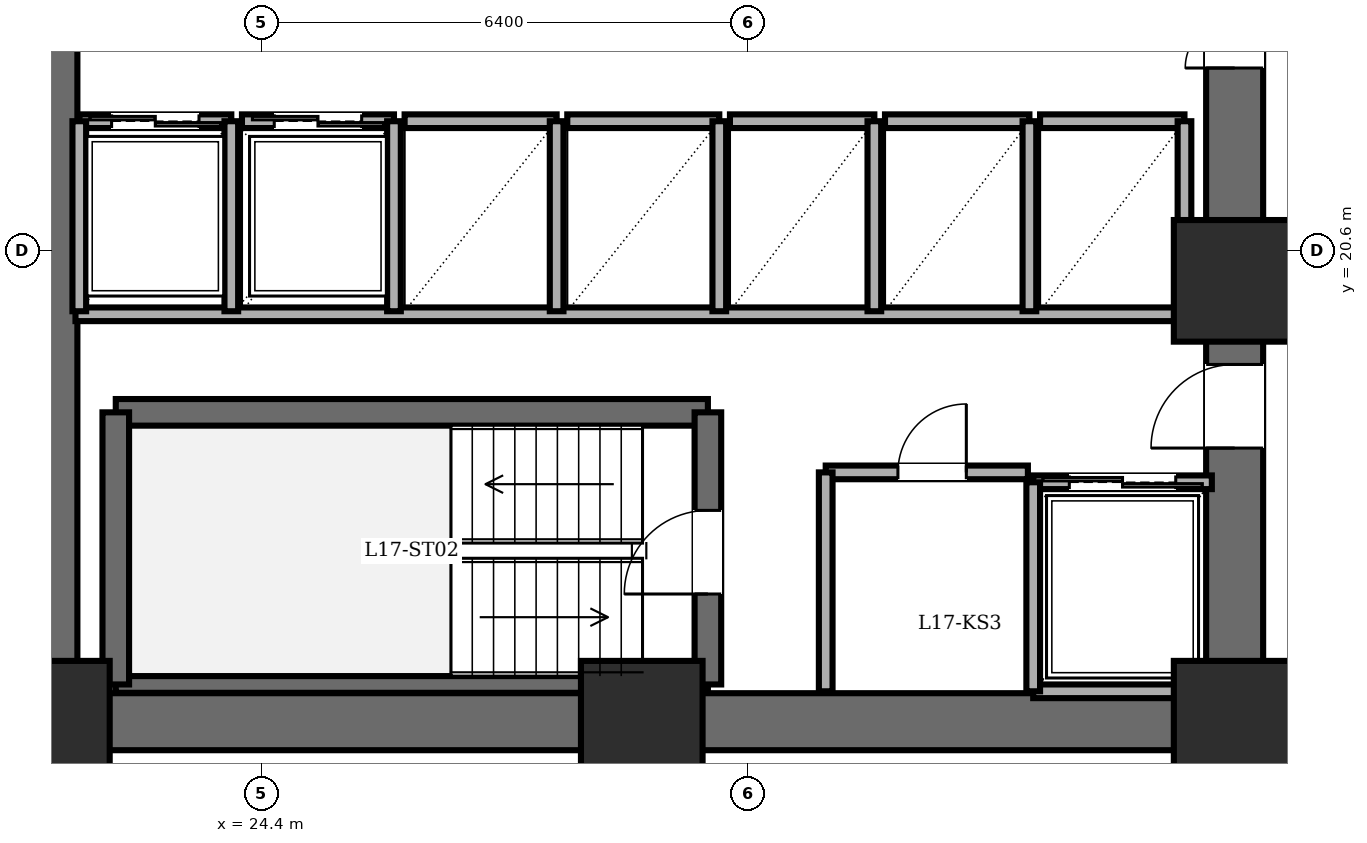
"""IFC4 building model, lengths in metres.
Left out: names, types, materials, properties, quantities, classifications, styles, units other than length and angle.
Written with IfcOpenShell. Run it as: python <this file> out.ifc"""

import sys

from ifc_helpers import new_model, si_unit, direction, frame, frame_2d, origin, origin_2d, place, context, subcontext, project, spatial, rectangle, extrude, element, fill, save


model = new_model("IFC4")
c1 = context("Model", 3, precision=1e-05, world=origin(), true_north=direction((0.0, 1.0)))
c2 = subcontext(c1, "Body", "Model", "MODEL_VIEW")
j1 = project(units=[si_unit("LENGTHUNIT", "METRE"), si_unit("PLANEANGLEUNIT", "RADIAN")], contexts=[c1])
p1 = place(None, origin())
s1 = spatial("IfcSite", under=j1, at=p1, CompositionType="ELEMENT")
p2 = place(p1, origin())
s2 = spatial("IfcBuilding", under=s1, at=p2, CompositionType="ELEMENT")
p3 = place(p2, frame((0.0, 0.0, 64.8)))
s3 = spatial("IfcBuildingStorey", under=s2, at=p3, CompositionType="ELEMENT", Elevation=64.8)
for number, where, z_axis, x_axis in (
    (1, (21.6, 14.4, 0.0), (0.0, 0.0, 1.0), (1.0, 0.0, 0.0)),
    (2, (29.4, 14.4, 0.0), (0.0, 0.0, 1.0), (1.0, 0.0, 0.0)),
    (3, (37.2, 14.4, 0.0), (0.0, 0.0, 1.0), (1.0, 0.0, 0.0)),
    (4, (37.2, 20.2, 0.0), (0.0, 0.0, 1.0), (1.0, 0.0, 0.0)),
):
    element("IfcColumn", number, at=place(p3, frame(where, z_axis=z_axis, x_axis=x_axis)), inside=s3, PredefinedType="COLUMN", context=c2, shape_type="SweptSolid", body=[
        extrude(rectangle(XDim=1.6, YDim=1.6, at=origin_2d()), origin(), (0.0, 0.0, 1.0), 3.6),
    ])
p4 = place(p3, frame((21.6, 14.4, 0.0), z_axis=(0.0, 0.0, 1.0), x_axis=(0.0, 1.0, 0.0)))
e5 = element("IfcWall", 5, at=p4, inside=s3, PredefinedType="SHEAR", context=c2, shape_type="SweptSolid", body=[
    extrude(rectangle(XDim=19.2, YDim=0.75, at=frame_2d((9.6, 0.0))), origin(), (0.0, 0.0, 1.0), 3.4),
])
p5 = place(p3, frame((37.2, 14.4, 0.0), z_axis=(0.0, 0.0, 1.0), x_axis=(-1.0, 0.0, 0.0)))
e6 = element("IfcWall", 6, at=p5, inside=s3, PredefinedType="SHEAR", context=c2, shape_type="SweptSolid", body=[
    extrude(rectangle(XDim=15.6, YDim=0.75, at=frame_2d((7.8, 0.0))), origin(), (0.0, 0.0, 1.0), 3.4),
])
p6 = place(p3, frame((37.2, 14.4, 0.0), z_axis=(0.0, 0.0, 1.0), x_axis=(0.0, 1.0, 0.0)))
e7 = element("IfcWall", 7, at=p6, inside=s3, PredefinedType="SHEAR", context=c2, shape_type="SweptSolid", body=[
    extrude(rectangle(XDim=19.2, YDim=0.75, at=frame_2d((9.6, 0.0))), origin(), (0.0, 0.0, 1.0), 3.4),
])
p7 = place(p6, frame((15.8, 0.0, 0.0)))
e8 = element("IfcOpeningElement", 8, at=p7, cuts=e7, PredefinedType="OPENING", context=c2, shape_type="SweptSolid", body=[
    extrude(rectangle(XDim=1.15, YDim=2.15, at=frame_2d((0.575, 1.075))), frame((0.0, 0.385, 0.0), z_axis=(0.0, -1.0, 0.0), x_axis=(1.0, 0.0, 0.0)), (0.0, 0.0, 1.0), 0.77),
])
p8 = place(p6, frame((3.6, 0.0, 0.0)))
e9 = element("IfcOpeningElement", 9, at=p8, cuts=e7, PredefinedType="OPENING", context=c2, shape_type="SweptSolid", body=[
    extrude(rectangle(XDim=1.1, YDim=2.15, at=frame_2d((0.55, 1.075))), frame((0.0, 0.385, 0.0), z_axis=(0.0, -1.0, 0.0), x_axis=(1.0, 0.0, 0.0)), (0.0, 0.0, 1.0), 0.77),
])
p9 = place(p6, frame((8.6, 0.0, 0.0)))
e10 = element("IfcOpeningElement", 10, at=p9, cuts=e7, PredefinedType="OPENING", context=c2, shape_type="SweptSolid", body=[
    extrude(rectangle(XDim=1.3, YDim=2.2, at=frame_2d((0.65, 1.1))), frame((0.0, 0.385, 0.0), z_axis=(0.0, -1.0, 0.0), x_axis=(1.0, 0.0, 0.0)), (0.0, 0.0, 1.0), 0.77),
])
p10 = place(p3, frame((22.48, 18.47, 0.0), z_axis=(0.0, 0.0, 1.0), x_axis=(1.0, 0.0, 0.0)))
e11 = element("IfcWall", 11, at=p10, inside=s3, PredefinedType="SOLIDWALL", context=c2, shape_type="SweptSolid", body=[
    extrude(rectangle(XDim=7.79, YDim=0.35, at=frame_2d((3.895, 0.0))), origin(), (0.0, 0.0, 1.0), 3.4),
])
p11 = place(p3, frame((22.48, 14.89, 0.0), z_axis=(0.0, 0.0, 1.0), x_axis=(1.0, 0.0, 0.0)))
e12 = element("IfcWall", 12, at=p11, inside=s3, PredefinedType="PARTITIONING", context=c2, shape_type="SweptSolid", body=[
    extrude(rectangle(XDim=7.79, YDim=0.22, at=frame_2d((3.895, 0.0))), origin(), (0.0, 0.0, 1.0), 3.4),
])
p12 = place(p3, frame((22.48, 14.89, 0.0), z_axis=(0.0, 0.0, 1.0), x_axis=(0.0, 1.0, 0.0)))
e13 = element("IfcWall", 13, at=p12, inside=s3, PredefinedType="SOLIDWALL", context=c2, shape_type="SweptSolid", body=[
    extrude(rectangle(XDim=3.58, YDim=0.35, at=frame_2d((1.79, 0.0))), origin(), (0.0, 0.0, 1.0), 3.4),
])
p13 = place(p3, frame((30.27, 14.89, 0.0), z_axis=(0.0, 0.0, 1.0), x_axis=(0.0, 1.0, 0.0)))
e14 = element("IfcWall", 14, at=p13, inside=s3, PredefinedType="SOLIDWALL", context=c2, shape_type="SweptSolid", body=[
    extrude(rectangle(XDim=3.58, YDim=0.35, at=frame_2d((1.79, 0.0))), origin(), (0.0, 0.0, 1.0), 3.4),
])
p14 = place(p13, frame((1.19, 0.0, 0.0)))
e15 = element("IfcOpeningElement", 15, at=p14, cuts=e14, PredefinedType="OPENING", context=c2, shape_type="SweptSolid", body=[
    extrude(rectangle(XDim=1.1, YDim=2.15, at=frame_2d((0.55, 1.075))), frame((0.0, 0.185, 0.0), z_axis=(0.0, -1.0, 0.0), x_axis=(1.0, 0.0, 0.0)), (0.0, 0.0, 1.0), 0.37),
])
p15 = place(p3, frame((21.95, 19.76, 0.0), z_axis=(0.0, 0.0, 1.0), x_axis=(1.0, 0.0, 0.0)))
e16 = element("IfcWall", 16, at=p15, inside=s3, PredefinedType="PARTITIONING", context=c2, shape_type="SweptSolid", body=[
    extrude(rectangle(XDim=14.87, YDim=0.18, at=frame_2d((7.435, 0.0))), origin(), (0.0, 0.0, 1.0), 3.4),
])
p16 = place(p3, frame((31.82, 17.68, 0.0), z_axis=(0.0, 0.0, 1.0), x_axis=(1.0, 0.0, 0.0)))
e17 = element("IfcWall", 17, at=p16, inside=s3, PredefinedType="PARTITIONING", context=c2, shape_type="SweptSolid", body=[
    extrude(rectangle(XDim=2.66, YDim=0.18, at=frame_2d((1.33, 0.0))), origin(), (0.0, 0.0, 1.0), 3.4),
])
p17 = place(p16, frame((0.95, 0.0, 0.0)))
e18 = element("IfcOpeningElement", 18, at=p17, cuts=e17, PredefinedType="OPENING", context=c2, shape_type="SweptSolid", body=[
    extrude(rectangle(XDim=0.9, YDim=2.05, at=frame_2d((0.45, 1.025))), frame((0.0, 0.1, 0.0), z_axis=(0.0, -1.0, 0.0), x_axis=(1.0, 0.0, 0.0)), (0.0, 0.0, 1.0), 0.2),
])
p18 = place(p3, frame((31.82, 14.8, 0.0), z_axis=(0.0, 0.0, 1.0), x_axis=(0.0, 1.0, 0.0)))
e19 = element("IfcWall", 19, at=p18, inside=s3, PredefinedType="PARTITIONING", context=c2, shape_type="SweptSolid", body=[
    extrude(rectangle(XDim=2.88, YDim=0.18, at=frame_2d((1.44, 0.0))), origin(), (0.0, 0.0, 1.0), 3.4),
])
p19 = place(p3, frame((34.55, 17.55, 0.0), z_axis=(0.0, 0.0, 1.0), x_axis=(1.0, 0.0, 0.0)))
e20 = element("IfcWall", 20, at=p19, inside=s3, PredefinedType="PARTITIONING", context=c2, shape_type="SweptSolid", body=[
    extrude(rectangle(XDim=2.35, YDim=0.18, at=frame_2d((1.175, 0.0))), origin(), (0.0, 0.0, 1.0), 3.4),
])
p20 = place(p19, frame((0.475, 0.0, 0.0)))
e21 = element("IfcOpeningElement", 21, at=p20, cuts=e20, PredefinedType="OPENING", context=c2, shape_type="SweptSolid", body=[
    extrude(rectangle(XDim=1.4, YDim=2.3, at=frame_2d((0.7, 1.15))), frame((0.0, 0.1, 0.0), z_axis=(0.0, -1.0, 0.0), x_axis=(1.0, 0.0, 0.0)), (0.0, 0.0, 1.0), 0.2),
])
p21 = place(p3, frame((36.9, 14.8, 0.0), z_axis=(0.0, 0.0, 1.0), x_axis=(-1.0, 0.0, 0.0)))
e22 = element("IfcWall", 22, at=p21, inside=s3, PredefinedType="PARTITIONING", context=c2, shape_type="SweptSolid", body=[
    extrude(rectangle(XDim=2.35, YDim=0.18, at=frame_2d((1.175, 0.0))), origin(), (0.0, 0.0, 1.0), 3.4),
])
p22 = place(p3, frame((34.55, 17.55, 0.0), z_axis=(0.0, 0.0, 1.0), x_axis=(0.0, -1.0, 0.0)))
e23 = element("IfcWall", 23, at=p22, inside=s3, PredefinedType="PARTITIONING", context=c2, shape_type="SweptSolid", body=[
    extrude(rectangle(XDim=2.75, YDim=0.18, at=frame_2d((1.375, 0.0))), origin(), (0.0, 0.0, 1.0), 3.4),
])
p23 = place(p3, frame((22.0, 22.3, 0.0), z_axis=(0.0, 0.0, 1.0), x_axis=(1.0, 0.0, 0.0)))
e24 = element("IfcWall", 24, at=p23, inside=s3, PredefinedType="PARTITIONING", context=c2, shape_type="SweptSolid", body=[
    extrude(rectangle(XDim=2.0, YDim=0.18, at=frame_2d((1.0, 0.0))), origin(), (0.0, 0.0, 1.0), 3.4),
])
p24 = place(p23, frame((0.425, 0.0, 0.0)))
e25 = element("IfcOpeningElement", 25, at=p24, cuts=e24, PredefinedType="OPENING", context=c2, shape_type="SweptSolid", body=[
    extrude(rectangle(XDim=1.15, YDim=2.2, at=frame_2d((0.575, 1.1))), frame((0.0, 0.1, 0.0), z_axis=(0.0, -1.0, 0.0), x_axis=(1.0, 0.0, 0.0)), (0.0, 0.0, 1.0), 0.2),
])
for number, where, z_axis, x_axis in (
    (26, (24.0, 19.8, 0.0), (0.0, 0.0, 1.0), (0.0, 1.0, 0.0)),
    (27, (22.0, 22.3, 0.0), (0.0, 0.0, 1.0), (0.0, -1.0, 0.0)),
):
    element("IfcWall", number, at=place(p3, frame(where, z_axis=z_axis, x_axis=x_axis)), inside=s3, PredefinedType="PARTITIONING", context=c2, shape_type="SweptSolid", body=[
        extrude(rectangle(XDim=2.5, YDim=0.18, at=frame_2d((1.25, 0.0))), origin(), (0.0, 0.0, 1.0), 3.4),
    ])
p25 = place(p3, frame((24.14, 22.3, 0.0), z_axis=(0.0, 0.0, 1.0), x_axis=(1.0, 0.0, 0.0)))
e28 = element("IfcWall", 28, at=p25, inside=s3, PredefinedType="PARTITIONING", context=c2, shape_type="SweptSolid", body=[
    extrude(rectangle(XDim=2.0, YDim=0.18, at=frame_2d((1.0, 0.0))), origin(), (0.0, 0.0, 1.0), 3.4),
])
p26 = place(p25, frame((0.425, 0.0, 0.0)))
e29 = element("IfcOpeningElement", 29, at=p26, cuts=e28, PredefinedType="OPENING", context=c2, shape_type="SweptSolid", body=[
    extrude(rectangle(XDim=1.15, YDim=2.2, at=frame_2d((0.575, 1.1))), frame((0.0, 0.1, 0.0), z_axis=(0.0, -1.0, 0.0), x_axis=(1.0, 0.0, 0.0)), (0.0, 0.0, 1.0), 0.2),
])
p27 = place(p3, frame((26.14, 19.8, 0.0), z_axis=(0.0, 0.0, 1.0), x_axis=(0.0, 1.0, 0.0)))
e30 = element("IfcWall", 30, at=p27, inside=s3, PredefinedType="PARTITIONING", context=c2, shape_type="SweptSolid", body=[
    extrude(rectangle(XDim=2.5, YDim=0.18, at=frame_2d((1.25, 0.0))), origin(), (0.0, 0.0, 1.0), 3.4),
])
p28 = place(p3, frame((26.28, 22.3, 0.0), z_axis=(0.0, 0.0, 1.0), x_axis=(1.0, 0.0, 0.0)))
e31 = element("IfcWall", 31, at=p28, inside=s3, PredefinedType="PARTITIONING", context=c2, shape_type="SweptSolid", body=[
    extrude(rectangle(XDim=2.0, YDim=0.18, at=frame_2d((1.0, 0.0))), origin(), (0.0, 0.0, 1.0), 3.4),
])
p29 = place(p3, frame((28.28, 19.8, 0.0), z_axis=(0.0, 0.0, 1.0), x_axis=(0.0, 1.0, 0.0)))
e32 = element("IfcWall", 32, at=p29, inside=s3, PredefinedType="PARTITIONING", context=c2, shape_type="SweptSolid", body=[
    extrude(rectangle(XDim=2.5, YDim=0.18, at=frame_2d((1.25, 0.0))), origin(), (0.0, 0.0, 1.0), 3.4),
])
p30 = place(p3, frame((28.42, 22.3, 0.0), z_axis=(0.0, 0.0, 1.0), x_axis=(1.0, 0.0, 0.0)))
e33 = element("IfcWall", 33, at=p30, inside=s3, PredefinedType="PARTITIONING", context=c2, shape_type="SweptSolid", body=[
    extrude(rectangle(XDim=2.0, YDim=0.18, at=frame_2d((1.0, 0.0))), origin(), (0.0, 0.0, 1.0), 3.4),
])
p31 = place(p3, frame((30.42, 19.8, 0.0), z_axis=(0.0, 0.0, 1.0), x_axis=(0.0, 1.0, 0.0)))
e34 = element("IfcWall", 34, at=p31, inside=s3, PredefinedType="PARTITIONING", context=c2, shape_type="SweptSolid", body=[
    extrude(rectangle(XDim=2.5, YDim=0.18, at=frame_2d((1.25, 0.0))), origin(), (0.0, 0.0, 1.0), 3.4),
])
p32 = place(p3, frame((30.56, 22.3, 0.0), z_axis=(0.0, 0.0, 1.0), x_axis=(1.0, 0.0, 0.0)))
e35 = element("IfcWall", 35, at=p32, inside=s3, PredefinedType="PARTITIONING", context=c2, shape_type="SweptSolid", body=[
    extrude(rectangle(XDim=1.9, YDim=0.18, at=frame_2d((0.95, 0.0))), origin(), (0.0, 0.0, 1.0), 3.4),
])
p33 = place(p3, frame((32.46, 19.8, 0.0), z_axis=(0.0, 0.0, 1.0), x_axis=(0.0, 1.0, 0.0)))
e36 = element("IfcWall", 36, at=p33, inside=s3, PredefinedType="PARTITIONING", context=c2, shape_type="SweptSolid", body=[
    extrude(rectangle(XDim=2.5, YDim=0.18, at=frame_2d((1.25, 0.0))), origin(), (0.0, 0.0, 1.0), 3.4),
])
p34 = place(p3, frame((32.6, 22.3, 0.0), z_axis=(0.0, 0.0, 1.0), x_axis=(1.0, 0.0, 0.0)))
e37 = element("IfcWall", 37, at=p34, inside=s3, PredefinedType="PARTITIONING", context=c2, shape_type="SweptSolid", body=[
    extrude(rectangle(XDim=1.9, YDim=0.18, at=frame_2d((0.95, 0.0))), origin(), (0.0, 0.0, 1.0), 3.4),
])
p35 = place(p3, frame((34.5, 19.8, 0.0), z_axis=(0.0, 0.0, 1.0), x_axis=(0.0, 1.0, 0.0)))
e38 = element("IfcWall", 38, at=p35, inside=s3, PredefinedType="PARTITIONING", context=c2, shape_type="SweptSolid", body=[
    extrude(rectangle(XDim=2.5, YDim=0.18, at=frame_2d((1.25, 0.0))), origin(), (0.0, 0.0, 1.0), 3.4),
])
p36 = place(p3, frame((34.64, 22.3, 0.0), z_axis=(0.0, 0.0, 1.0), x_axis=(1.0, 0.0, 0.0)))
e39 = element("IfcWall", 39, at=p36, inside=s3, PredefinedType="PARTITIONING", context=c2, shape_type="SweptSolid", body=[
    extrude(rectangle(XDim=1.9, YDim=0.18, at=frame_2d((0.95, 0.0))), origin(), (0.0, 0.0, 1.0), 3.4),
])
p37 = place(p3, frame((36.54, 19.8, 0.0), z_axis=(0.0, 0.0, 1.0), x_axis=(0.0, 1.0, 0.0)))
e40 = element("IfcWall", 40, at=p37, inside=s3, PredefinedType="PARTITIONING", context=c2, shape_type="SweptSolid", body=[
    extrude(rectangle(XDim=2.5, YDim=0.18, at=frame_2d((1.25, 0.0))), origin(), (0.0, 0.0, 1.0), 3.4),
])
p38 = place(p14, origin())
e41 = element("IfcDoor", 41, at=p38, inside=s3, OperationType="SINGLE_SWING_LEFT", PredefinedType="DOOR", context=c2, shape_type="SweptSolid", body=[
    extrude(rectangle(XDim=1.1, YDim=2.15, at=frame_2d((0.55, 1.075))), frame((0.0, 0.025, 0.0), z_axis=(0.0, -1.0, 0.0), x_axis=(1.0, 0.0, 0.0)), (0.0, 0.0, 1.0), 0.05),
])
fill(e15, e41)
p39 = place(p8, origin())
e42 = element("IfcDoor", 42, at=p39, inside=s3, OperationType="SINGLE_SWING_LEFT", PredefinedType="DOOR", context=c2, shape_type="SweptSolid", body=[
    extrude(rectangle(XDim=1.1, YDim=2.15, at=frame_2d((0.55, 1.075))), frame((0.0, 0.025, 0.0), z_axis=(0.0, -1.0, 0.0), x_axis=(1.0, 0.0, 0.0)), (0.0, 0.0, 1.0), 0.05),
])
fill(e9, e42)
p40 = place(p17, origin())
e43 = element("IfcDoor", 43, at=p40, inside=s3, OperationType="SINGLE_SWING_RIGHT", PredefinedType="DOOR", context=c2, shape_type="SweptSolid", body=[
    extrude(rectangle(XDim=0.9, YDim=2.05, at=frame_2d((0.45, 1.025))), frame((0.0, 0.025, 0.0), z_axis=(0.0, -1.0, 0.0), x_axis=(1.0, 0.0, 0.0)), (0.0, 0.0, 1.0), 0.05),
])
fill(e18, e43)
p41 = place(p20, origin())
e44 = element("IfcDoor", 44, at=p41, inside=s3, OperationType="DOUBLE_DOOR_SLIDING", PredefinedType="DOOR", context=c2, shape_type="SweptSolid", body=[
    extrude(rectangle(XDim=1.4, YDim=2.3, at=frame_2d((0.7, 1.15))), frame((0.0, 0.025, 0.0), z_axis=(0.0, -1.0, 0.0), x_axis=(1.0, 0.0, 0.0)), (0.0, 0.0, 1.0), 0.05),
])
fill(e21, e44)
p42 = place(p24, origin())
e45 = element("IfcDoor", 45, at=p42, inside=s3, OperationType="DOUBLE_DOOR_SLIDING", PredefinedType="DOOR", context=c2, shape_type="SweptSolid", body=[
    extrude(rectangle(XDim=1.15, YDim=2.2, at=frame_2d((0.575, 1.1))), frame((0.0, 0.025, 0.0), z_axis=(0.0, -1.0, 0.0), x_axis=(1.0, 0.0, 0.0)), (0.0, 0.0, 1.0), 0.05),
])
fill(e25, e45)
p43 = place(p26, origin())
e46 = element("IfcDoor", 46, at=p43, inside=s3, OperationType="DOUBLE_DOOR_SLIDING", PredefinedType="DOOR", context=c2, shape_type="SweptSolid", body=[
    extrude(rectangle(XDim=1.15, YDim=2.2, at=frame_2d((0.575, 1.1))), frame((0.0, 0.025, 0.0), z_axis=(0.0, -1.0, 0.0), x_axis=(1.0, 0.0, 0.0)), (0.0, 0.0, 1.0), 0.05),
])
fill(e29, e46)
p44 = place(p9, origin())
e47 = element("IfcDoor", 47, at=p44, inside=s3, OperationType="DOUBLE_DOOR_SINGLE_SWING", PredefinedType="DOOR", context=c2, shape_type="SweptSolid", body=[
    extrude(rectangle(XDim=1.3, YDim=2.2, at=frame_2d((0.65, 1.1))), frame((0.0, 0.025, 0.0), z_axis=(0.0, -1.0, 0.0), x_axis=(1.0, 0.0, 0.0)), (0.0, 0.0, 1.0), 0.05),
])
fill(e10, e47)
save(model, sys.argv[1])
